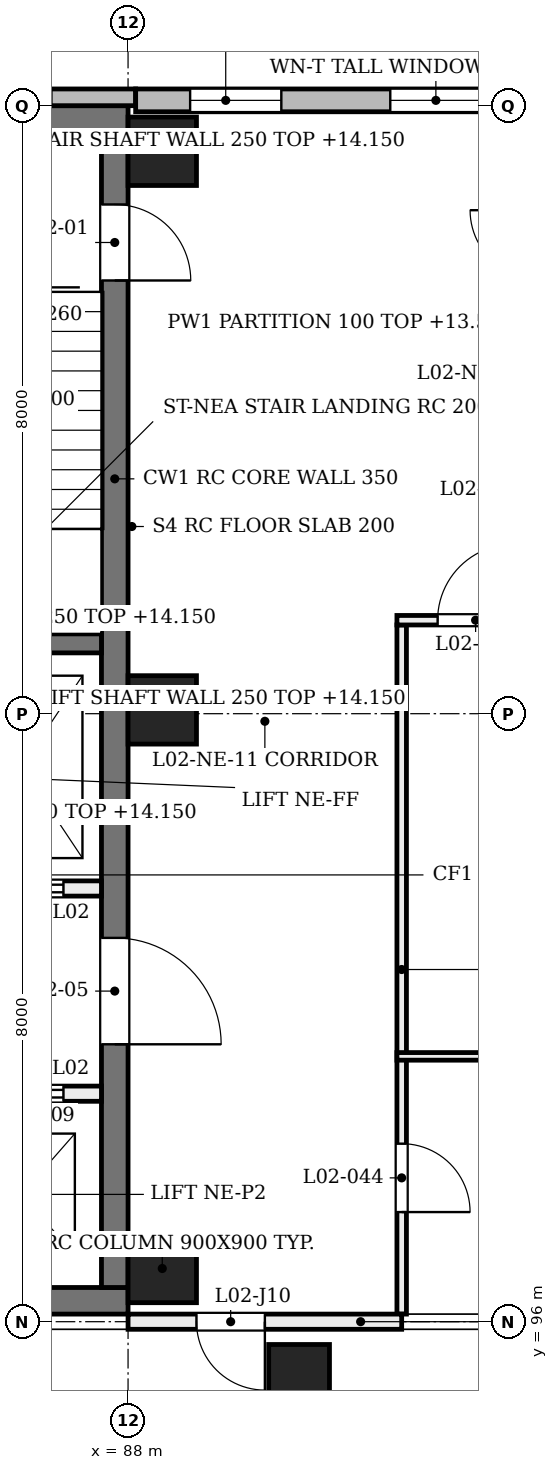
"""IFC4 building model, lengths in metres.
Left out: names, types, materials, properties, quantities, classifications, styles, units other than length and angle.
Written with IfcOpenShell. Run it as: python <this file> out.ifc"""

import sys

from ifc_helpers import new_model, si_unit, direction, frame, frame_2d, origin, origin_2d, place, context, subcontext, project, spatial, rectangle, extrude, element, fill, save


model = new_model("IFC4")
c1 = context("Model", 3, precision=1e-05, world=origin(), true_north=direction((0.0, 1.0)))
c2 = subcontext(c1, "Body", "Model", "MODEL_VIEW")
j1 = project(units=[si_unit("LENGTHUNIT", "METRE"), si_unit("PLANEANGLEUNIT", "RADIAN")], contexts=[c1])
p1 = place(None, origin())
s1 = spatial("IfcSite", under=j1, at=p1, CompositionType="ELEMENT")
p2 = place(p1, origin())
s2 = spatial("IfcBuilding", under=s1, at=p2, CompositionType="ELEMENT")
p3 = place(p2, frame((0.0, 0.0, 9.6)))
s3 = spatial("IfcBuildingStorey", under=s2, at=p3, CompositionType="ELEMENT", Elevation=9.6)
for number, where, z_axis, x_axis in (
    (1, (80.1, 96.275, 0.0), (0.0, 0.0, 1.0), (1.0, 0.0, 0.0)),
    (2, (80.1, 111.825, 0.0), (0.0, 0.0, 1.0), (1.0, 0.0, 0.0)),
):
    element("IfcWall", number, at=place(p3, frame(where, z_axis=z_axis, x_axis=x_axis)), inside=s3, PredefinedType="SHEAR", context=c2, shape_type="SweptSolid", body=[
        extrude(rectangle(XDim=7.9, YDim=0.35, at=frame_2d((3.95, 0.0))), origin(), (0.0, 0.0, 1.0), 4.58),
    ])
p4 = place(p3, frame((87.825, 96.45, 0.0), z_axis=(0.0, 0.0, 1.0), x_axis=(0.0, 1.0, 0.0)))
e3 = element("IfcWall", 3, at=p4, inside=s3, PredefinedType="SHEAR", context=c2, shape_type="SweptSolid", body=[
    extrude(rectangle(XDim=15.2, YDim=0.35, at=frame_2d((7.6, 0.0))), origin(), (0.0, 0.0, 1.0), 4.58),
])
p5 = place(p4, frame((13.25, 0.0, 0.0)))
e4 = element("IfcOpeningElement", 4, at=p5, cuts=e3, PredefinedType="OPENING", context=c2, shape_type="SweptSolid", body=[
    extrude(rectangle(XDim=1.0, YDim=2.1, at=frame_2d((0.5, 1.05))), frame((0.0, 0.185, 0.0), z_axis=(0.0, -1.0, 0.0), x_axis=(1.0, 0.0, 0.0)), (0.0, 0.0, 1.0), 0.37),
])
p6 = place(p4, frame((3.2, 0.0, 0.0)))
e5 = element("IfcOpeningElement", 5, at=p6, cuts=e3, PredefinedType="OPENING", context=c2, shape_type="SweptSolid", body=[
    extrude(rectangle(XDim=1.4, YDim=2.1, at=frame_2d((0.7, 1.05))), frame((0.0, 0.185, 0.0), z_axis=(0.0, -1.0, 0.0), x_axis=(1.0, 0.0, 0.0)), (0.0, 0.0, 1.0), 0.37),
])
for number, where, z_axis, x_axis in (
    (6, (88.45, 96.7, 0.0), (0.0, 0.0, 1.0), (1.0, 0.0, 0.0)),
    (7, (88.45, 104.05, 0.0), (0.0, 0.0, 1.0), (1.0, 0.0, 0.0)),
    (8, (88.45, 111.4, 0.0), (0.0, 0.0, 1.0), (1.0, 0.0, 0.0)),
):
    element("IfcColumn", number, at=place(p3, frame(where, z_axis=z_axis, x_axis=x_axis)), inside=s3, PredefinedType="COLUMN", context=c2, shape_type="SweptSolid", body=[
        extrude(rectangle(XDim=0.9, YDim=0.9, at=origin_2d()), origin(), (0.0, 0.0, 1.0), 4.8),
    ])
p7 = place(p3, frame((90.0, 95.3, 0.0), z_axis=(0.203962208122, 0.0, 0.978978762618), x_axis=(0.0, 1.0, 0.0)))
e9 = element("IfcColumn", 9, at=p7, inside=s3, PredefinedType="COLUMN", context=c2, shape_type="SweptSolid", body=[
    extrude(rectangle(XDim=0.8, YDim=0.8, at=origin_2d()), origin(), (0.0, 0.0, 1.0), 4.903),
])
p8 = place(p3, frame((79.9, 112.11, 0.0), z_axis=(0.0, 0.0, 1.0), x_axis=(1.0, 0.0, 0.0)))
e10 = element("IfcWall", 10, at=p8, inside=s3, PredefinedType="SOLIDWALL", context=c2, shape_type="SweptSolid", body=[
    extrude(rectangle(XDim=8.2, YDim=0.22, at=frame_2d((4.1, 0.0))), origin(), (0.0, 0.0, 1.0), 3.9),
])
p9 = place(p8, frame((1.308, 0.0, 0.9)))
e11 = element("IfcOpeningElement", 11, at=p9, cuts=e10, PredefinedType="OPENING", context=c2, shape_type="SweptSolid", body=[
    extrude(rectangle(XDim=0.45, YDim=2.6, at=frame_2d((0.225, 1.3))), frame((0.0, 0.12, 0.0), z_axis=(0.0, -1.0, 0.0), x_axis=(1.0, 0.0, 0.0)), (0.0, 0.0, 1.0), 0.24),
])
p10 = place(p8, frame((3.975, 0.0, 0.9)))
e12 = element("IfcOpeningElement", 12, at=p10, cuts=e10, PredefinedType="OPENING", context=c2, shape_type="SweptSolid", body=[
    extrude(rectangle(XDim=0.45, YDim=2.6, at=frame_2d((0.225, 1.3))), frame((0.0, 0.12, 0.0), z_axis=(0.0, -1.0, 0.0), x_axis=(1.0, 0.0, 0.0)), (0.0, 0.0, 1.0), 0.24),
])
p11 = place(p8, frame((6.642, 0.0, 0.9)))
e13 = element("IfcOpeningElement", 13, at=p11, cuts=e10, PredefinedType="OPENING", context=c2, shape_type="SweptSolid", body=[
    extrude(rectangle(XDim=0.45, YDim=2.6, at=frame_2d((0.225, 1.3))), frame((0.0, 0.12, 0.0), z_axis=(0.0, -1.0, 0.0), x_axis=(1.0, 0.0, 0.0)), (0.0, 0.0, 1.0), 0.24),
])
p12 = place(p3, frame((88.1, 112.07, 0.0), z_axis=(0.0, 0.0, 1.0), x_axis=(1.0, 0.0, 0.0)))
e14 = element("IfcWall", 14, at=p12, inside=s3, PredefinedType="SOLIDWALL", context=c2, shape_type="SweptSolid", body=[
    extrude(rectangle(XDim=7.9, YDim=0.3, at=frame_2d((3.95, 0.0))), origin(), (0.0, 0.0, 1.0), 3.9),
])
p13 = place(p12, frame((0.717, 0.0, 0.75)))
e15 = element("IfcOpeningElement", 15, at=p13, cuts=e14, PredefinedType="OPENING", context=c2, shape_type="SweptSolid", body=[
    extrude(rectangle(XDim=1.2, YDim=3.1, at=frame_2d((0.6, 1.55))), frame((0.0, 0.16, 0.0), z_axis=(0.0, -1.0, 0.0), x_axis=(1.0, 0.0, 0.0)), (0.0, 0.0, 1.0), 0.32),
])
p14 = place(p12, frame((3.35, 0.0, 0.75)))
e16 = element("IfcOpeningElement", 16, at=p14, cuts=e14, PredefinedType="OPENING", context=c2, shape_type="SweptSolid", body=[
    extrude(rectangle(XDim=1.2, YDim=3.1, at=frame_2d((0.6, 1.55))), frame((0.0, 0.16, 0.0), z_axis=(0.0, -1.0, 0.0), x_axis=(1.0, 0.0, 0.0)), (0.0, 0.0, 1.0), 0.32),
])
p15 = place(p12, frame((5.983, 0.0, 0.75)))
e17 = element("IfcOpeningElement", 17, at=p15, cuts=e14, PredefinedType="OPENING", context=c2, shape_type="SweptSolid", body=[
    extrude(rectangle(XDim=1.2, YDim=3.1, at=frame_2d((0.6, 1.55))), frame((0.0, 0.16, 0.0), z_axis=(0.0, -1.0, 0.0), x_axis=(1.0, 0.0, 0.0)), (0.0, 0.0, 1.0), 0.32),
])
p16 = place(p3, frame((87.65, 104.925, 0.0), z_axis=(0.0, 0.0, 1.0), x_axis=(-1.0, 0.0, 0.0)))
e18 = element("IfcWall", 18, at=p16, inside=s3, PredefinedType="SOLIDWALL", context=c2, shape_type="SweptSolid", body=[
    extrude(rectangle(XDim=3.1, YDim=0.25, at=frame_2d((1.55, 0.0))), origin(), (0.0, 0.0, 1.0), 4.55),
])
p17 = place(p3, frame((87.65, 101.7, 0.0), z_axis=(0.0, 0.0, 1.0), x_axis=(-1.0, 0.0, 0.0)))
e19 = element("IfcWall", 19, at=p17, inside=s3, PredefinedType="SOLIDWALL", context=c2, shape_type="SweptSolid", body=[
    extrude(rectangle(XDim=7.2, YDim=0.2, at=frame_2d((3.6, 0.0))), origin(), (0.0, 0.0, 1.0), 4.55),
])
p18 = place(p17, frame((0.5, 0.0, 0.0)))
e20 = element("IfcOpeningElement", 20, at=p18, cuts=e19, PredefinedType="OPENING", context=c2, shape_type="SweptSolid", body=[
    extrude(rectangle(XDim=1.1, YDim=2.1, at=frame_2d((0.55, 1.05))), frame((0.0, 0.11, 0.0), z_axis=(0.0, -1.0, 0.0), x_axis=(1.0, 0.0, 0.0)), (0.0, 0.0, 1.0), 0.22),
])
p19 = place(p17, frame((5.6, 0.0, 0.0)))
e21 = element("IfcOpeningElement", 21, at=p19, cuts=e19, PredefinedType="OPENING", context=c2, shape_type="SweptSolid", body=[
    extrude(rectangle(XDim=1.1, YDim=2.1, at=frame_2d((0.55, 1.05))), frame((0.0, 0.11, 0.0), z_axis=(0.0, -1.0, 0.0), x_axis=(1.0, 0.0, 0.0)), (0.0, 0.0, 1.0), 0.22),
])
p20 = place(p17, frame((3.1, 0.0, 0.0)))
e22 = element("IfcOpeningElement", 22, at=p20, cuts=e19, PredefinedType="OPENING", context=c2, shape_type="SweptSolid", body=[
    extrude(rectangle(XDim=1.0, YDim=2.1, at=frame_2d((0.5, 1.05))), frame((0.0, 0.11, 0.0), z_axis=(0.0, -1.0, 0.0), x_axis=(1.0, 0.0, 0.0)), (0.0, 0.0, 1.0), 0.22),
])
p21 = place(p3, frame((87.65, 99.0, 0.0), z_axis=(0.0, 0.0, 1.0), x_axis=(-1.0, 0.0, 0.0)))
e23 = element("IfcWall", 23, at=p21, inside=s3, PredefinedType="SOLIDWALL", context=c2, shape_type="SweptSolid", body=[
    extrude(rectangle(XDim=7.2, YDim=0.2, at=frame_2d((3.6, 0.0))), origin(), (0.0, 0.0, 1.0), 4.55),
])
p22 = place(p21, frame((0.5, 0.0, 0.0)))
e24 = element("IfcOpeningElement", 24, at=p22, cuts=e23, PredefinedType="OPENING", context=c2, shape_type="SweptSolid", body=[
    extrude(rectangle(XDim=1.1, YDim=2.1, at=frame_2d((0.55, 1.05))), frame((0.0, 0.11, 0.0), z_axis=(0.0, -1.0, 0.0), x_axis=(1.0, 0.0, 0.0)), (0.0, 0.0, 1.0), 0.22),
])
p23 = place(p21, frame((5.6, 0.0, 0.0)))
e25 = element("IfcOpeningElement", 25, at=p23, cuts=e23, PredefinedType="OPENING", context=c2, shape_type="SweptSolid", body=[
    extrude(rectangle(XDim=1.1, YDim=2.1, at=frame_2d((0.55, 1.05))), frame((0.0, 0.11, 0.0), z_axis=(0.0, -1.0, 0.0), x_axis=(1.0, 0.0, 0.0)), (0.0, 0.0, 1.0), 0.22),
])
p24 = place(p21, frame((3.1, 0.0, 0.0)))
e26 = element("IfcOpeningElement", 26, at=p24, cuts=e23, PredefinedType="OPENING", context=c2, shape_type="SweptSolid", body=[
    extrude(rectangle(XDim=1.0, YDim=2.1, at=frame_2d((0.5, 1.05))), frame((0.0, 0.11, 0.0), z_axis=(0.0, -1.0, 0.0), x_axis=(1.0, 0.0, 0.0)), (0.0, 0.0, 1.0), 0.22),
])
p25 = place(p3, frame((91.6, 96.1, 0.0), z_axis=(0.0, 0.0, 1.0), x_axis=(0.0, 1.0, 0.0)))
e27 = element("IfcWall", 27, at=p25, inside=s3, PredefinedType="PARTITIONING", context=c2, shape_type="SweptSolid", body=[
    extrude(rectangle(XDim=9.068, YDim=0.125, at=frame_2d((4.534, 0.0))), origin(), (0.0, 0.0, 1.0), 3.88),
])
p26 = place(p25, frame((1.343, 0.0, 0.0)))
e28 = element("IfcOpeningElement", 28, at=p26, cuts=e27, PredefinedType="OPENING", context=c2, shape_type="SweptSolid", body=[
    extrude(rectangle(XDim=0.9, YDim=2.1, at=frame_2d((0.45, 1.05))), frame((0.0, 0.073, 0.0), z_axis=(0.0, -1.0, 0.0), x_axis=(1.0, 0.0, 0.0)), (0.0, 0.0, 1.0), 0.145),
])
p27 = place(p3, frame((91.538, 99.491, 0.0), z_axis=(0.0, 0.0, 1.0), x_axis=(1.0, 0.0, 0.0)))
e29 = element("IfcWall", 29, at=p27, inside=s3, PredefinedType="PARTITIONING", context=c2, shape_type="SweptSolid", body=[
    extrude(rectangle(XDim=4.382, YDim=0.1, at=frame_2d((2.191, 0.0))), origin(), (0.0, 0.0, 1.0), 3.88),
])
p28 = place(p3, frame((91.538, 105.23, 0.0), z_axis=(0.0, 0.0, 1.0), x_axis=(1.0, 0.0, 0.0)))
e30 = element("IfcWall", 30, at=p28, inside=s3, PredefinedType="PARTITIONING", context=c2, shape_type="SweptSolid", body=[
    extrude(rectangle(XDim=1.925, YDim=0.125, at=frame_2d((0.962, 0.0))), origin(), (0.0, 0.0, 1.0), 4.56),
])
p29 = place(p28, frame((0.535, 0.0, 0.0)))
e31 = element("IfcOpeningElement", 31, at=p29, cuts=e30, PredefinedType="OPENING", context=c2, shape_type="SweptSolid", body=[
    extrude(rectangle(XDim=1.0, YDim=2.1, at=frame_2d((0.5, 1.05))), frame((0.0, 0.073, 0.0), z_axis=(0.0, -1.0, 0.0), x_axis=(1.0, 0.0, 0.0)), (0.0, 0.0, 1.0), 0.145),
])
p30 = place(p3, frame((88.0, 96.0, 0.0), z_axis=(0.0, 0.0, 1.0), x_axis=(1.0, 0.0, 0.0)))
e32 = element("IfcWall", 32, at=p30, inside=s3, PredefinedType="PARTITIONING", context=c2, shape_type="SweptSolid", body=[
    extrude(rectangle(XDim=3.6, YDim=0.2, at=frame_2d((1.8, 0.0))), origin(), (0.0, 0.0, 1.0), 3.88),
])
p31 = place(p30, frame((0.9, 0.0, 0.0)))
e33 = element("IfcOpeningElement", 33, at=p31, cuts=e32, PredefinedType="OPENING", context=c2, shape_type="SweptSolid", body=[
    extrude(rectangle(XDim=0.9, YDim=2.1, at=frame_2d((0.45, 1.05))), frame((0.0, 0.11, 0.0), z_axis=(0.0, -1.0, 0.0), x_axis=(1.0, 0.0, 0.0)), (0.0, 0.0, 1.0), 0.22),
])
p32 = place(p13, origin())
e34 = element("IfcWindow", 34, at=p32, inside=s3, PartitioningType="SINGLE_PANEL", PredefinedType="WINDOW", context=c2, shape_type="SweptSolid", body=[
    extrude(rectangle(XDim=1.2, YDim=3.1, at=frame_2d((0.6, 1.55))), frame((0.0, 0.03, 0.0), z_axis=(0.0, -1.0, 0.0), x_axis=(1.0, 0.0, 0.0)), (0.0, 0.0, 1.0), 0.06),
])
fill(e15, e34)
p33 = place(p14, origin())
e35 = element("IfcWindow", 35, at=p33, inside=s3, PartitioningType="SINGLE_PANEL", PredefinedType="WINDOW", context=c2, shape_type="SweptSolid", body=[
    extrude(rectangle(XDim=1.2, YDim=3.1, at=frame_2d((0.6, 1.55))), frame((0.0, 0.03, 0.0), z_axis=(0.0, -1.0, 0.0), x_axis=(1.0, 0.0, 0.0)), (0.0, 0.0, 1.0), 0.06),
])
fill(e16, e35)
p34 = place(p5, frame((1.0, 0.0, 0.0), z_axis=(0.0, 0.0, 1.0), x_axis=(-1.0, 0.0, 0.0)))
e36 = element("IfcDoor", 36, at=p34, inside=s3, OperationType="SINGLE_SWING_LEFT", PredefinedType="DOOR", context=c2, shape_type="SweptSolid", body=[
    extrude(rectangle(XDim=1.0, YDim=2.1, at=frame_2d((0.5, 1.05))), frame((0.0, 0.025, 0.0), z_axis=(0.0, -1.0, 0.0), x_axis=(1.0, 0.0, 0.0)), (0.0, 0.0, 1.0), 0.05),
])
fill(e4, e36)
p35 = place(p18, origin())
e37 = element("IfcDoor", 37, at=p35, inside=s3, OperationType="DOUBLE_DOOR_SLIDING", PredefinedType="DOOR", context=c2, shape_type="SweptSolid", body=[
    extrude(rectangle(XDim=1.1, YDim=2.1, at=frame_2d((0.55, 1.05))), frame((0.0, 0.025, 0.0), z_axis=(0.0, -1.0, 0.0), x_axis=(1.0, 0.0, 0.0)), (0.0, 0.0, 1.0), 0.05),
])
fill(e20, e37)
p36 = place(p22, frame((1.1, 0.0, 0.0), z_axis=(0.0, 0.0, 1.0), x_axis=(-1.0, 0.0, 0.0)))
e38 = element("IfcDoor", 38, at=p36, inside=s3, OperationType="DOUBLE_DOOR_SLIDING", PredefinedType="DOOR", context=c2, shape_type="SweptSolid", body=[
    extrude(rectangle(XDim=1.1, YDim=2.1, at=frame_2d((0.55, 1.05))), frame((0.0, 0.025, 0.0), z_axis=(0.0, -1.0, 0.0), x_axis=(1.0, 0.0, 0.0)), (0.0, 0.0, 1.0), 0.05),
])
fill(e24, e38)
p37 = place(p6, frame((1.4, 0.0, 0.0), z_axis=(0.0, 0.0, 1.0), x_axis=(-1.0, 0.0, 0.0)))
e39 = element("IfcDoor", 39, at=p37, inside=s3, OperationType="SINGLE_SWING_LEFT", PredefinedType="DOOR", context=c2, shape_type="SweptSolid", body=[
    extrude(rectangle(XDim=1.4, YDim=2.1, at=frame_2d((0.7, 1.05))), frame((0.0, 0.025, 0.0), z_axis=(0.0, -1.0, 0.0), x_axis=(1.0, 0.0, 0.0)), (0.0, 0.0, 1.0), 0.05),
])
fill(e5, e39)
p38 = place(p29, frame((1.0, 0.0, 0.0), z_axis=(0.0, 0.0, 1.0), x_axis=(-1.0, 0.0, 0.0)))
e40 = element("IfcDoor", 40, at=p38, inside=s3, OperationType="SINGLE_SWING_RIGHT", PredefinedType="DOOR", context=c2, shape_type="SweptSolid", body=[
    extrude(rectangle(XDim=1.0, YDim=2.1, at=frame_2d((0.5, 1.05))), frame((0.0, 0.025, 0.0), z_axis=(0.0, -1.0, 0.0), x_axis=(1.0, 0.0, 0.0)), (0.0, 0.0, 1.0), 0.05),
])
fill(e31, e40)
p39 = place(p26, frame((0.9, 0.0, 0.0), z_axis=(0.0, 0.0, 1.0), x_axis=(-1.0, 0.0, 0.0)))
e41 = element("IfcDoor", 41, at=p39, inside=s3, OperationType="SINGLE_SWING_LEFT", PredefinedType="DOOR", context=c2, shape_type="SweptSolid", body=[
    extrude(rectangle(XDim=0.9, YDim=2.1, at=frame_2d((0.45, 1.05))), frame((0.0, 0.025, 0.0), z_axis=(0.0, -1.0, 0.0), x_axis=(1.0, 0.0, 0.0)), (0.0, 0.0, 1.0), 0.05),
])
fill(e28, e41)
p40 = place(p31, origin())
e42 = element("IfcDoor", 42, at=p40, inside=s3, OperationType="SINGLE_SWING_RIGHT", PredefinedType="DOOR", context=c2, shape_type="SweptSolid", body=[
    extrude(rectangle(XDim=0.9, YDim=2.1, at=frame_2d((0.45, 1.05))), frame((0.0, 0.025, 0.0), z_axis=(0.0, -1.0, 0.0), x_axis=(1.0, 0.0, 0.0)), (0.0, 0.0, 1.0), 0.05),
])
fill(e33, e42)
save(model, sys.argv[1])
